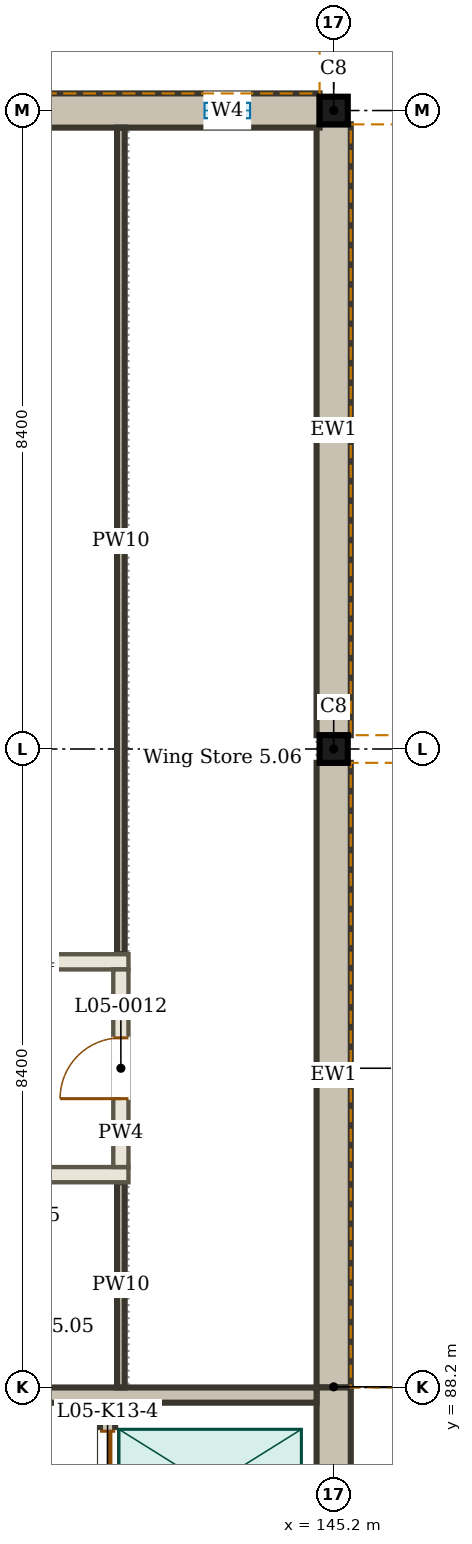
"""IFC4 building model, lengths in metres.
Left out: names, types, materials, properties, quantities, classifications, styles, units other than length and angle.
Written with IfcOpenShell. Run it as: python <this file> out.ifc"""

import sys

from ifc_helpers import new_model, si_unit, direction, frame, frame_2d, origin, origin_2d, place, context, subcontext, project, spatial, rectangle, i_section, extrude, element, fill, save


model = new_model("IFC4")
c1 = context("Model", 3, precision=1e-05, world=origin(), true_north=direction((0.0, 1.0)))
c2 = subcontext(c1, "Body", "Model", "MODEL_VIEW")
j1 = project(units=[si_unit("LENGTHUNIT", "METRE"), si_unit("PLANEANGLEUNIT", "RADIAN")], contexts=[c1])
p1 = place(None, origin())
s1 = spatial("IfcSite", under=j1, at=p1, CompositionType="ELEMENT")
p2 = place(p1, origin())
s2 = spatial("IfcBuilding", under=s1, at=p2, CompositionType="ELEMENT")
p3 = place(p2, frame((0.0, 0.0, 22.5)))
s3 = spatial("IfcBuildingStorey", under=s2, at=p3, CompositionType="ELEMENT", Elevation=22.5)
for number, where, z_axis, x_axis in (
    (1, (145.2, 96.6, 0.0), (0.0, 0.0, 1.0), (1.0, 0.0, 0.0)),
    (2, (145.2, 105.0, 0.0), (0.0, 0.0, 1.0), (1.0, 0.0, 0.0)),
):
    element("IfcColumn", number, at=place(p3, frame(where, z_axis=z_axis, x_axis=x_axis)), inside=s3, PredefinedType="COLUMN", context=c2, shape_type="SweptSolid", body=[
        extrude(i_section(OverallWidth=0.371, OverallDepth=0.364, WebThickness=0.013, FlangeThickness=0.022, FilletRadius=0.027, at=origin_2d()), origin(), (0.0, 0.0, 1.0), 4.5),
    ])
p4 = place(p3, frame((145.2, 88.2, 0.0), z_axis=(0.0, 0.0, 1.0), x_axis=(0.0, 1.0, 0.0)))
e3 = element("IfcWall", 3, at=p4, inside=s3, PredefinedType="SOLIDWALL", context=c2, shape_type="SweptSolid", body=[
    extrude(rectangle(XDim=8.218, YDim=0.45, at=frame_2d((4.109, 0.0))), origin(), (0.0, 0.0, 1.0), 3.85),
])
p5 = place(p3, frame((145.2, 96.782, 0.0), z_axis=(0.0, 0.0, 1.0), x_axis=(0.0, 1.0, 0.0)))
e4 = element("IfcWall", 4, at=p5, inside=s3, PredefinedType="SOLIDWALL", context=c2, shape_type="SweptSolid", body=[
    extrude(rectangle(XDim=8.036, YDim=0.45, at=frame_2d((4.018, 0.0))), origin(), (0.0, 0.0, 1.0), 3.85),
])
p6 = place(p3, frame((136.986, 105.0, 0.0), z_axis=(0.0, 0.0, 1.0), x_axis=(1.0, 0.0, 0.0)))
e5 = element("IfcWall", 5, at=p6, inside=s3, PredefinedType="SOLIDWALL", context=c2, shape_type="SweptSolid", body=[
    extrude(rectangle(XDim=8.029, YDim=0.45, at=frame_2d((4.014, 0.0))), origin(), (0.0, 0.0, 1.0), 3.85),
])
p7 = place(p6, frame((0.915, 0.0, 2.1)))
e6 = element("IfcOpeningElement", 6, at=p7, cuts=e5, PredefinedType="OPENING", context=c2, shape_type="SweptSolid", body=[
    extrude(rectangle(XDim=0.6, YDim=1.2, at=frame_2d((0.3, 0.6))), frame((0.0, 0.235, 0.0), z_axis=(0.0, -1.0, 0.0), x_axis=(1.0, 0.0, 0.0)), (0.0, 0.0, 1.0), 0.47),
])
p8 = place(p6, frame((3.715, 0.0, 2.1)))
e7 = element("IfcOpeningElement", 7, at=p8, cuts=e5, PredefinedType="OPENING", context=c2, shape_type="SweptSolid", body=[
    extrude(rectangle(XDim=0.6, YDim=1.2, at=frame_2d((0.3, 0.6))), frame((0.0, 0.235, 0.0), z_axis=(0.0, -1.0, 0.0), x_axis=(1.0, 0.0, 0.0)), (0.0, 0.0, 1.0), 0.47),
])
p9 = place(p6, frame((6.514, 0.0, 2.1)))
e8 = element("IfcOpeningElement", 8, at=p9, cuts=e5, PredefinedType="OPENING", context=c2, shape_type="SweptSolid", body=[
    extrude(rectangle(XDim=0.6, YDim=1.2, at=frame_2d((0.3, 0.6))), frame((0.0, 0.235, 0.0), z_axis=(0.0, -1.0, 0.0), x_axis=(1.0, 0.0, 0.0)), (0.0, 0.0, 1.0), 0.47),
])
p10 = place(p3, frame((136.7, 91.0, 0.0), z_axis=(0.0, 0.0, 1.0), x_axis=(1.0, 0.0, 0.0)))
e9 = element("IfcWall", 9, at=p10, inside=s3, PredefinedType="PARTITIONING", context=c2, shape_type="SweptSolid", body=[
    extrude(rectangle(XDim=5.8, YDim=0.2, at=frame_2d((2.9, 0.0))), origin(), (0.0, 0.0, 1.0), 3.844),
])
p11 = place(p10, frame((3.9, 0.0, 0.0)))
e10 = element("IfcOpeningElement", 10, at=p11, cuts=e9, PredefinedType="OPENING", context=c2, shape_type="SweptSolid", body=[
    extrude(rectangle(XDim=0.8, YDim=2.1, at=frame_2d((0.4, 1.05))), frame((0.0, 0.11, 0.0), z_axis=(0.0, -1.0, 0.0), x_axis=(1.0, 0.0, 0.0)), (0.0, 0.0, 1.0), 0.22),
])
p12 = place(p3, frame((136.8, 93.8, 0.0), z_axis=(0.0, 0.0, 1.0), x_axis=(1.0, 0.0, 0.0)))
e11 = element("IfcWall", 11, at=p12, inside=s3, PredefinedType="PARTITIONING", context=c2, shape_type="SweptSolid", body=[
    extrude(rectangle(XDim=5.7, YDim=0.2, at=frame_2d((2.85, 0.0))), origin(), (0.0, 0.0, 1.0), 3.844),
])
p13 = place(p12, frame((2.4, 0.0, 0.0)))
e12 = element("IfcOpeningElement", 12, at=p13, cuts=e11, PredefinedType="OPENING", context=c2, shape_type="SweptSolid", body=[
    extrude(rectangle(XDim=0.8, YDim=2.1, at=frame_2d((0.4, 1.05))), frame((0.0, 0.11, 0.0), z_axis=(0.0, -1.0, 0.0), x_axis=(1.0, 0.0, 0.0)), (0.0, 0.0, 1.0), 0.22),
])
p14 = place(p3, frame((142.4, 88.2, 0.0), z_axis=(0.0, 0.0, 1.0), x_axis=(0.0, 1.0, 0.0)))
e13 = element("IfcWall", 13, at=p14, inside=s3, PredefinedType="SOLIDWALL", context=c2, shape_type="SweptSolid", body=[
    extrude(rectangle(XDim=2.7, YDim=0.1, at=frame_2d((1.35, 0.0))), origin(), (0.0, 0.0, 1.0), 3.936),
])
p15 = place(p3, frame((142.4, 91.1, 0.0), z_axis=(0.0, 0.0, 1.0), x_axis=(0.0, 1.0, 0.0)))
e14 = element("IfcWall", 14, at=p15, inside=s3, PredefinedType="PARTITIONING", context=c2, shape_type="SweptSolid", body=[
    extrude(rectangle(XDim=2.6, YDim=0.2, at=frame_2d((1.3, 0.0))), origin(), (0.0, 0.0, 1.0), 3.936),
])
p16 = place(p15, frame((0.9, 0.0, 0.0)))
e15 = element("IfcOpeningElement", 15, at=p16, cuts=e14, PredefinedType="OPENING", context=c2, shape_type="SweptSolid", body=[
    extrude(rectangle(XDim=0.8, YDim=2.1, at=frame_2d((0.4, 1.05))), frame((0.0, 0.11, 0.0), z_axis=(0.0, -1.0, 0.0), x_axis=(1.0, 0.0, 0.0)), (0.0, 0.0, 1.0), 0.22),
])
p17 = place(p3, frame((142.4, 93.9, 0.0), z_axis=(0.0, 0.0, 1.0), x_axis=(0.0, 1.0, 0.0)))
e16 = element("IfcWall", 16, at=p17, inside=s3, PredefinedType="SOLIDWALL", context=c2, shape_type="SweptSolid", body=[
    extrude(rectangle(XDim=10.875, YDim=0.1, at=frame_2d((5.438, 0.0))), origin(), (0.0, 0.0, 1.0), 3.844),
])
p18 = place(p3, frame((145.2, 79.8, 0.0), z_axis=(0.0, 0.0, 1.0), x_axis=(0.0, 1.0, 0.0)))
e17 = element("IfcWall", 17, at=p18, inside=s3, PredefinedType="SOLIDWALL", context=c2, shape_type="SweptSolid", body=[
    extrude(rectangle(XDim=8.4, YDim=0.45, at=frame_2d((4.2, 0.0))), origin(), (0.0, 0.0, 1.0), 4.5),
])
p19 = place(p3, frame((137.0, 88.1, 0.0), z_axis=(0.0, 0.0, 1.0), x_axis=(1.0, 0.0, 0.0)))
e18 = element("IfcWall", 18, at=p19, inside=s3, PredefinedType="SOLIDWALL", context=c2, shape_type="SweptSolid", body=[
    extrude(rectangle(XDim=7.975, YDim=0.2, at=frame_2d((3.988, 0.0))), origin(), (0.0, 0.0, 1.0), 4.5),
])
p20 = place(p3, frame((142.225, 86.15, 0.0), z_axis=(0.0, 0.0, 1.0), x_axis=(0.0, 1.0, 0.0)))
e19 = element("IfcWall", 19, at=p20, inside=s3, PredefinedType="SOLIDWALL", context=c2, shape_type="SweptSolid", body=[
    extrude(rectangle(XDim=1.85, YDim=0.2, at=frame_2d((0.925, 0.0))), origin(), (0.0, 0.0, 1.0), 4.5),
])
p21 = place(p20, frame((0.375, 0.0, 0.0)))
e20 = element("IfcOpeningElement", 20, at=p21, cuts=e19, PredefinedType="OPENING", context=c2, shape_type="SweptSolid", body=[
    extrude(rectangle(XDim=1.1, YDim=2.1, at=frame_2d((0.55, 1.05))), frame((0.0, 0.11, 0.0), z_axis=(0.0, -1.0, 0.0), x_axis=(1.0, 0.0, 0.0)), (0.0, 0.0, 1.0), 0.22),
])
p22 = place(p9, origin())
e21 = element("IfcWindow", 21, at=p22, inside=s3, PartitioningType="SINGLE_PANEL", PredefinedType="WINDOW", context=c2, shape_type="SweptSolid", body=[
    extrude(rectangle(XDim=0.6, YDim=1.2, at=frame_2d((0.3, 0.6))), frame((0.0, -0.075, 0.0), z_axis=(0.0, -1.0, 0.0), x_axis=(1.0, 0.0, 0.0)), (0.0, 0.0, 1.0), 0.06),
])
fill(e8, e21)
p23 = place(p16, origin())
e22 = element("IfcDoor", 22, at=p23, inside=s3, OperationType="SINGLE_SWING_LEFT", PredefinedType="DOOR", context=c2, shape_type="SweptSolid", body=[
    extrude(rectangle(XDim=0.8, YDim=2.1, at=frame_2d((0.4, 1.05))), frame((0.0, 0.025, 0.0), z_axis=(0.0, -1.0, 0.0), x_axis=(1.0, 0.0, 0.0)), (0.0, 0.0, 1.0), 0.05),
])
fill(e15, e22)
p24 = place(p21, origin())
e23 = element("IfcDoor", 23, at=p24, inside=s3, OperationType="DOUBLE_DOOR_SLIDING", PredefinedType="DOOR", context=c2, shape_type="SweptSolid", body=[
    extrude(rectangle(XDim=1.1, YDim=2.1, at=frame_2d((0.55, 1.05))), frame((0.0, 0.025, 0.0), z_axis=(0.0, -1.0, 0.0), x_axis=(1.0, 0.0, 0.0)), (0.0, 0.0, 1.0), 0.05),
])
fill(e20, e23)
save(model, sys.argv[1])
